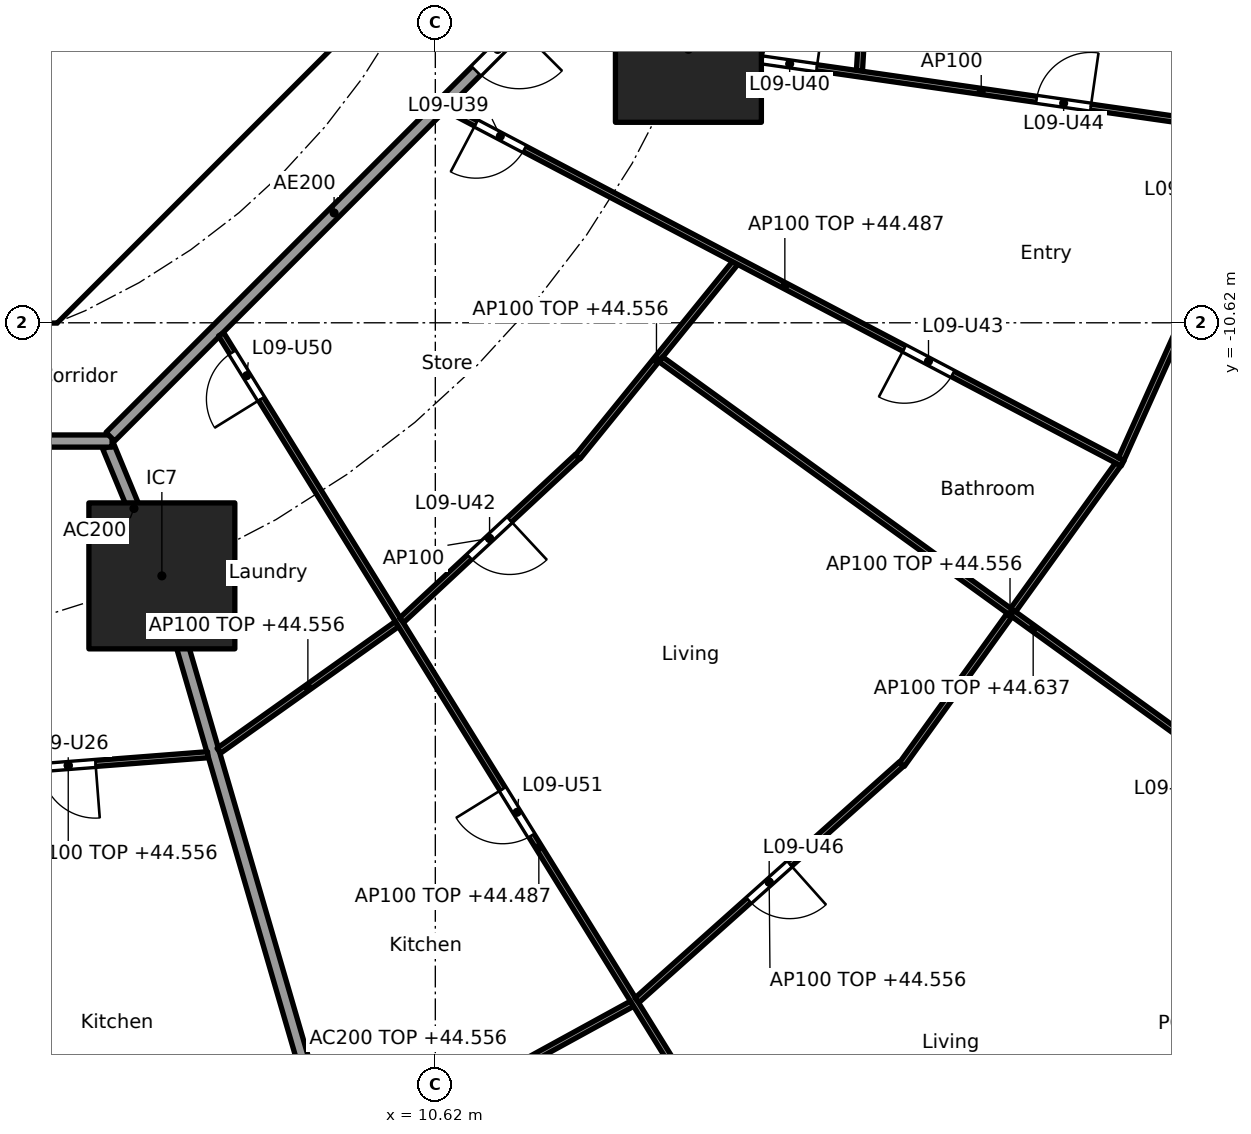
"""IFC4 building model, lengths in metres.
Left out: names, types, materials, properties, quantities, classifications, styles, units other than length and angle.
Written with IfcOpenShell. Run it as: python <this file> out.ifc"""

import sys

from ifc_helpers import new_model, si_unit, direction, frame, frame_2d, origin, origin_2d, place, context, subcontext, project, spatial, polyline, rectangle, outline, extrude, element, fill, save


model = new_model("IFC4")
c1 = context("Model", 3, precision=1e-05, world=origin(), true_north=direction((0.0, 1.0)))
c2 = subcontext(c1, "Body", "Model", "MODEL_VIEW")
j1 = project(units=[si_unit("LENGTHUNIT", "METRE"), si_unit("PLANEANGLEUNIT", "RADIAN")], contexts=[c1])
p1 = place(None, origin())
s1 = spatial("IfcSite", under=j1, at=p1, CompositionType="ELEMENT")
p2 = place(p1, origin())
s2 = spatial("IfcBuilding", under=s1, at=p2, CompositionType="ELEMENT")
p3 = place(p2, frame((0.0, 0.0, 41.8)))
s3 = spatial("IfcBuildingStorey", under=s2, at=p3, CompositionType="ELEMENT", Elevation=41.8)
for number, where, z_axis, x_axis in (
    (1, (6.123, -14.782, 0.0), (0.0, 0.0, 1.0), (1.0, 0.0, 0.0)),
    (2, (14.782, -6.123, 0.0), (0.0, 0.0, 1.0), (1.0, 0.0, 0.0)),
):
    element("IfcColumn", number, at=place(p3, frame(where, z_axis=z_axis, x_axis=x_axis)), inside=s3, PredefinedType="COLUMN", context=c2, shape_type="SweptSolid", body=[
        extrude(rectangle(XDim=2.4, YDim=2.4, at=origin_2d()), origin(), (0.0, 0.0, 1.0), 3.7),
    ])
p4 = place(p3, frame((4.613, -9.988, 0.0), z_axis=(0.0, 0.0, 1.0), x_axis=(0.707106781187, 0.707106781187, 0.0)))
e3 = element("IfcWall", 3, at=p4, inside=s3, PredefinedType="SHEAR", context=c2, shape_type="SweptSolid", body=[
    extrude(rectangle(XDim=7.602, YDim=0.6, at=frame_2d((3.801, 0.0))), origin(), (0.0, 0.0, 1.0), 3.44),
])
p5 = place(p4, frame((3.201, 0.0, 0.0)))
e4 = element("IfcOpeningElement", 4, at=p5, cuts=e3, PredefinedType="OPENING", context=c2, shape_type="SweptSolid", body=[
    extrude(rectangle(XDim=1.2, YDim=2.1, at=frame_2d((0.6, 1.05))), frame((0.0, 0.31, 0.0), z_axis=(0.0, -1.0, 0.0), x_axis=(1.0, 0.0, 0.0)), (0.0, 0.0, 1.0), 0.62),
])
p6 = place(p3, origin())
e5 = element("IfcWall", 5, at=p6, inside=s3, PredefinedType="SHEAR", context=c2, shape_type="SweptSolid", body=[
    extrude(outline(polyline([(-4.152, -10.025), (4.152, -10.025), (4.401, -9.776), (4.825, -10.2), (4.401, -10.625), (-4.401, -10.625), (-4.825, -10.2), (-4.401, -9.776), (-4.152, -10.025)])), origin(), (0.0, 0.0, 1.0), 3.44),
])
p7 = place(p3, frame((5.243, -12.657, 0.0), z_axis=(0.0, 0.0, 1.0), x_axis=(0.382707856524, -0.923869415315, 0.0)))
e6 = element("IfcWall", 6, at=p7, inside=s3, PredefinedType="PARTITIONING", context=c2, shape_type="SweptSolid", body=[
    extrude(rectangle(XDim=2.2, YDim=0.2, at=frame_2d((1.1, 0.0))), origin(), (0.0, 0.0, 1.0), 3.44),
])
p8 = place(p3, frame((6.137, -14.83, 0.0), z_axis=(0.0, 0.0, 1.0), x_axis=(0.27985745069, -0.960041565399, 0.0)))
e7 = element("IfcWall", 7, at=p8, inside=s3, PredefinedType="PARTITIONING", context=c2, shape_type="SweptSolid", body=[
    extrude(rectangle(XDim=16.705, YDim=0.2, at=frame_2d((8.353, 0.0))), origin(), (0.0, 0.0, 1.0), 2.756),
])
p9 = place(p3, frame((-5.104, -12.565, 0.0), z_axis=(0.0, 0.0, 1.0), x_axis=(1.0, 0.0, 0.0)))
e8 = element("IfcWall", 8, at=p9, inside=s3, PredefinedType="PARTITIONING", context=c2, shape_type="SweptSolid", body=[
    extrude(rectangle(XDim=10.409, YDim=0.2, at=frame_2d((5.205, 0.0))), origin(), (0.0, 0.0, 1.0), 3.44),
])
p10 = place(p9, frame((2.87, 0.0, 0.0)))
e9 = element("IfcOpeningElement", 9, at=p10, cuts=e8, PredefinedType="OPENING", context=c2, shape_type="SweptSolid", body=[
    extrude(rectangle(XDim=1.0, YDim=2.1, at=frame_2d((0.5, 1.05))), frame((0.0, 0.11, 0.0), z_axis=(0.0, -1.0, 0.0), x_axis=(1.0, 0.0, 0.0)), (0.0, 0.0, 1.0), 0.22),
])
p11 = place(p3, frame((5.275, -12.494, 0.0), z_axis=(0.0, 0.0, 1.0), x_axis=(0.707106781187, 0.707106781187, 0.0)))
e10 = element("IfcWall", 10, at=p11, inside=s3, PredefinedType="PARTITIONING", context=c2, shape_type="SweptSolid", body=[
    extrude(rectangle(XDim=10.409, YDim=0.2, at=frame_2d((5.205, 0.0))), origin(), (0.0, 0.0, 1.0), 3.44),
])
p12 = place(p11, frame((8.508, 0.0, 0.0)))
e11 = element("IfcOpeningElement", 11, at=p12, cuts=e10, PredefinedType="OPENING", context=c2, shape_type="SweptSolid", body=[
    extrude(rectangle(XDim=1.0, YDim=2.1, at=frame_2d((0.5, 1.05))), frame((0.0, 0.11, 0.0), z_axis=(0.0, -1.0, 0.0), x_axis=(1.0, 0.0, 0.0)), (0.0, 0.0, 1.0), 0.22),
])
p13 = place(p3, frame((17.971, -0.05, 0.0), z_axis=(0.0, 0.0, 1.0), x_axis=(-0.058475267553, -0.998288857538, 0.0)))
e12 = element("IfcWall", 12, at=p13, inside=s3, PredefinedType="PARTITIONING", context=c2, shape_type="SweptSolid", body=[
    extrude(rectangle(XDim=6.438, YDim=0.1, at=frame_2d((3.219, 0.0))), origin(), (0.0, 0.0, 1.0), 2.756),
])
p14 = place(p3, frame((2.288, -18.078, 0.0), z_axis=(0.0, 0.0, 1.0), x_axis=(0.99701850123, 0.077162868047, 0.0)))
e13 = element("IfcWall", 13, at=p14, inside=s3, PredefinedType="PARTITIONING", context=c2, shape_type="SweptSolid", body=[
    extrude(rectangle(XDim=4.604, YDim=0.1, at=frame_2d((2.302, 0.0))), origin(), (0.0, 0.0, 1.0), 2.756),
])
p15 = place(p14, frame((1.852, 0.0, 0.0)))
e14 = element("IfcOpeningElement", 14, at=p15, cuts=e13, PredefinedType="OPENING", context=c2, shape_type="SweptSolid", body=[
    extrude(rectangle(XDim=0.9, YDim=2.1, at=frame_2d((0.45, 1.05))), frame((0.0, 0.06, 0.0), z_axis=(0.0, -1.0, 0.0), x_axis=(1.0, 0.0, 0.0)), (0.0, 0.0, 1.0), 0.12),
])
p16 = place(p3, frame((7.06, -17.657, 0.0), z_axis=(0.0, 0.0, 1.0), x_axis=(0.81492039338, 0.57957290521, 0.0)))
e15 = element("IfcWall", 15, at=p16, inside=s3, PredefinedType="PARTITIONING", context=c2, shape_type="SweptSolid", body=[
    extrude(rectangle(XDim=3.594, YDim=0.1, at=frame_2d((1.797, 0.0))), origin(), (0.0, 0.0, 1.0), 2.756),
])
p17 = place(p3, frame((9.045, -24.456, 0.0), z_axis=(0.0, 0.0, 1.0), x_axis=(0.876809987787, 0.480837025734, 0.0)))
e16 = element("IfcWall", 16, at=p17, inside=s3, PredefinedType="PARTITIONING", context=c2, shape_type="SweptSolid", body=[
    extrude(rectangle(XDim=5.486, YDim=0.1, at=frame_2d((2.743, 0.0))), origin(), (0.0, 0.0, 1.0), 2.756),
])
p18 = place(p3, frame((7.097, -10.81, 0.0), z_axis=(0.0, 0.0, 1.0), x_axis=(0.526453266471, -0.850204068576, 0.0)))
e17 = element("IfcWall", 17, at=p18, inside=s3, PredefinedType="PARTITIONING", context=c2, shape_type="SweptSolid", body=[
    extrude(rectangle(XDim=19.85, YDim=0.1, at=frame_2d((9.925, 0.0))), origin(), (0.0, 0.0, 1.0), 2.687),
])
p19 = place(p18, frame((0.35, 0.0, 0.0)))
e18 = element("IfcOpeningElement", 18, at=p19, cuts=e17, PredefinedType="OPENING", context=c2, shape_type="SweptSolid", body=[
    extrude(rectangle(XDim=0.9, YDim=2.1, at=frame_2d((0.45, 1.05))), frame((0.0, 0.06, 0.0), z_axis=(0.0, -1.0, 0.0), x_axis=(1.0, 0.0, 0.0)), (0.0, 0.0, 1.0), 0.12),
])
p20 = place(p18, frame((8.795, 0.0, 0.0)))
e19 = element("IfcOpeningElement", 19, at=p20, cuts=e17, PredefinedType="OPENING", context=c2, shape_type="SweptSolid", body=[
    extrude(rectangle(XDim=0.9, YDim=2.1, at=frame_2d((0.45, 1.05))), frame((0.0, 0.06, 0.0), z_axis=(0.0, -1.0, 0.0), x_axis=(1.0, 0.0, 0.0)), (0.0, 0.0, 1.0), 0.12),
])
p21 = place(p18, frame((15.935, 0.0, 0.0)))
e20 = element("IfcOpeningElement", 20, at=p21, cuts=e17, PredefinedType="OPENING", context=c2, shape_type="SweptSolid", body=[
    extrude(rectangle(XDim=0.9, YDim=2.1, at=frame_2d((0.45, 1.05))), frame((0.0, 0.06, 0.0), z_axis=(0.0, -1.0, 0.0), x_axis=(1.0, 0.0, 0.0)), (0.0, 0.0, 1.0), 0.12),
])
p22 = place(p3, frame((10.066, -15.511, 0.0), z_axis=(0.0, 0.0, 1.0), x_axis=(0.732022571638, 0.681280378855, 0.0)))
e21 = element("IfcWall", 21, at=p22, inside=s3, PredefinedType="PARTITIONING", context=c2, shape_type="SweptSolid", body=[
    extrude(rectangle(XDim=3.95, YDim=0.1, at=frame_2d((1.975, 0.0))), origin(), (0.0, 0.0, 1.0), 3.44),
])
p23 = place(p22, frame((1.525, 0.0, 0.0)))
e22 = element("IfcOpeningElement", 22, at=p23, cuts=e21, PredefinedType="OPENING", context=c2, shape_type="SweptSolid", body=[
    extrude(rectangle(XDim=0.9, YDim=2.1, at=frame_2d((0.45, 1.05))), frame((0.0, 0.06, 0.0), z_axis=(0.0, -1.0, 0.0), x_axis=(1.0, 0.0, 0.0)), (0.0, 0.0, 1.0), 0.12),
])
p24 = place(p3, frame((13.936, -21.761, 0.0), z_axis=(0.0, 0.0, 1.0), x_axis=(0.745806142791, 0.666163041136, 0.0)))
e23 = element("IfcWall", 23, at=p24, inside=s3, PredefinedType="PARTITIONING", context=c2, shape_type="SweptSolid", body=[
    extrude(rectangle(XDim=5.831, YDim=0.1, at=frame_2d((2.915, 0.0))), origin(), (0.0, 0.0, 1.0), 2.756),
])
p25 = place(p24, frame((2.465, 0.0, 0.0)))
e24 = element("IfcOpeningElement", 24, at=p25, cuts=e23, PredefinedType="OPENING", context=c2, shape_type="SweptSolid", body=[
    extrude(rectangle(XDim=0.9, YDim=2.1, at=frame_2d((0.45, 1.05))), frame((0.0, 0.06, 0.0), z_axis=(0.0, -1.0, 0.0), x_axis=(1.0, 0.0, 0.0)), (0.0, 0.0, 1.0), 0.12),
])
p26 = place(p3, frame((12.963, -12.825, 0.0), z_axis=(0.0, 0.0, 1.0), x_axis=(0.63012473344, 0.776493928056, 0.0)))
e25 = element("IfcWall", 25, at=p26, inside=s3, PredefinedType="PARTITIONING", context=c2, shape_type="SweptSolid", body=[
    extrude(rectangle(XDim=4.106, YDim=0.1, at=frame_2d((2.053, 0.0))), origin(), (0.0, 0.0, 1.0), 2.756),
])
p27 = place(p3, frame((18.293, -17.884, 0.0), z_axis=(0.0, 0.0, 1.0), x_axis=(0.584558392935, 0.811351640936, 0.0)))
e26 = element("IfcWall", 26, at=p27, inside=s3, PredefinedType="PARTITIONING", context=c2, shape_type="SweptSolid", body=[
    extrude(rectangle(XDim=6.084, YDim=0.1, at=frame_2d((3.042, 0.0))), origin(), (0.0, 0.0, 1.0), 2.756),
])
p28 = place(p3, frame((14.329, -11.221, 0.0), z_axis=(0.0, 0.0, 1.0), x_axis=(0.810671130917, -0.58550176558, 0.0)))
e27 = element("IfcWall", 27, at=p28, inside=s3, PredefinedType="PARTITIONING", context=c2, shape_type="SweptSolid", body=[
    extrude(rectangle(XDim=15.106, YDim=0.1, at=frame_2d((7.553, 0.0))), origin(), (0.0, 0.0, 1.0), 2.837),
])
p29 = place(p28, frame((10.659, 0.0, 0.0)))
e28 = element("IfcOpeningElement", 28, at=p29, cuts=e27, PredefinedType="OPENING", context=c2, shape_type="SweptSolid", body=[
    extrude(rectangle(XDim=0.9, YDim=2.1, at=frame_2d((0.45, 1.05))), frame((0.0, 0.06, 0.0), z_axis=(0.0, -1.0, 0.0), x_axis=(1.0, 0.0, 0.0)), (0.0, 0.0, 1.0), 0.12),
])
p30 = place(p3, frame((10.813, -7.091, 0.0), z_axis=(0.0, 0.0, 1.0), x_axis=(0.885182649479, -0.465243674928, 0.0)))
e29 = element("IfcWall", 29, at=p30, inside=s3, PredefinedType="PARTITIONING", context=c2, shape_type="SweptSolid", body=[
    extrude(rectangle(XDim=12.551, YDim=0.1, at=frame_2d((6.275, 0.0))), origin(), (0.0, 0.0, 1.0), 2.687),
])
p31 = place(p30, frame((0.539, 0.0, 0.0)))
e30 = element("IfcOpeningElement", 30, at=p31, cuts=e29, PredefinedType="OPENING", context=c2, shape_type="SweptSolid", body=[
    extrude(rectangle(XDim=0.9, YDim=2.1, at=frame_2d((0.45, 1.05))), frame((0.0, 0.06, 0.0), z_axis=(0.0, -1.0, 0.0), x_axis=(1.0, 0.0, 0.0)), (0.0, 0.0, 1.0), 0.12),
])
p32 = place(p30, frame((8.494, 0.0, 0.0)))
e31 = element("IfcOpeningElement", 31, at=p32, cuts=e29, PredefinedType="OPENING", context=c2, shape_type="SweptSolid", body=[
    extrude(rectangle(XDim=0.9, YDim=2.1, at=frame_2d((0.45, 1.05))), frame((0.0, 0.06, 0.0), z_axis=(0.0, -1.0, 0.0), x_axis=(1.0, 0.0, 0.0)), (0.0, 0.0, 1.0), 0.12),
])
p33 = place(p3, frame((21.899, -12.861, 0.0), z_axis=(0.0, 0.0, 1.0), x_axis=(0.410197710154, 0.911996622025, 0.0)))
e32 = element("IfcWall", 32, at=p33, inside=s3, PredefinedType="PARTITIONING", context=c2, shape_type="SweptSolid", body=[
    extrude(rectangle(XDim=5.837, YDim=0.1, at=frame_2d((2.918, 0.0))), origin(), (0.0, 0.0, 1.0), 2.756),
])
p34 = place(p33, frame((3.928, 0.0, 0.0)))
e33 = element("IfcOpeningElement", 33, at=p34, cuts=e32, PredefinedType="OPENING", context=c2, shape_type="SweptSolid", body=[
    extrude(rectangle(XDim=0.9, YDim=2.1, at=frame_2d((0.45, 1.05))), frame((0.0, 0.06, 0.0), z_axis=(0.0, -1.0, 0.0), x_axis=(1.0, 0.0, 0.0)), (0.0, 0.0, 1.0), 0.12),
])
p35 = place(p3, frame((14.832, -6.13, 0.0), z_axis=(0.0, 0.0, 1.0), x_axis=(0.989837122016, -0.142205737856, 0.0)))
e34 = element("IfcWall", 34, at=p35, inside=s3, PredefinedType="PARTITIONING", context=c2, shape_type="SweptSolid", body=[
    extrude(rectangle(XDim=9.63, YDim=0.1, at=frame_2d((4.815, 0.0))), origin(), (0.0, 0.0, 1.0), 3.44),
])
p36 = place(p35, frame((1.182, 0.0, 0.0)))
e35 = element("IfcOpeningElement", 35, at=p36, cuts=e34, PredefinedType="OPENING", context=c2, shape_type="SweptSolid", body=[
    extrude(rectangle(XDim=0.9, YDim=2.1, at=frame_2d((0.45, 1.05))), frame((0.0, 0.06, 0.0), z_axis=(0.0, -1.0, 0.0), x_axis=(1.0, 0.0, 0.0)), (0.0, 0.0, 1.0), 0.12),
])
p37 = place(p35, frame((5.734, 0.0, 0.0)))
e36 = element("IfcOpeningElement", 36, at=p37, cuts=e34, PredefinedType="OPENING", context=c2, shape_type="SweptSolid", body=[
    extrude(rectangle(XDim=0.9, YDim=2.1, at=frame_2d((0.45, 1.05))), frame((0.0, 0.06, 0.0), z_axis=(0.0, -1.0, 0.0), x_axis=(1.0, 0.0, 0.0)), (0.0, 0.0, 1.0), 0.12),
])
p38 = place(p5, origin())
e37 = element("IfcDoor", 37, at=p38, inside=s3, OperationType="SINGLE_SWING_RIGHT", PredefinedType="DOOR", context=c2, shape_type="SweptSolid", body=[
    extrude(rectangle(XDim=1.2, YDim=2.1, at=frame_2d((0.6, 1.05))), frame((0.0, 0.025, 0.0), z_axis=(0.0, -1.0, 0.0), x_axis=(1.0, 0.0, 0.0)), (0.0, 0.0, 1.0), 0.05),
])
fill(e4, e37)
p39 = place(p15, frame((0.9, 0.0, 0.0), x_axis=(-1.0, 0.0, 0.0)))
e38 = element("IfcDoor", 38, at=p39, inside=s3, OperationType="SINGLE_SWING_LEFT", PredefinedType="DOOR", context=c2, shape_type="SweptSolid", body=[
    extrude(rectangle(XDim=0.9, YDim=2.1, at=frame_2d((0.45, 1.05))), frame((0.0, 0.025, 0.0), z_axis=(0.0, -1.0, 0.0), x_axis=(1.0, 0.0, 0.0)), (0.0, 0.0, 1.0), 0.05),
])
fill(e14, e38)
p40 = place(p12, frame((1.0, 0.0, 0.0), x_axis=(-1.0, 0.0, 0.0)))
e39 = element("IfcDoor", 39, at=p40, inside=s3, OperationType="SINGLE_SWING_LEFT", PredefinedType="DOOR", context=c2, shape_type="SweptSolid", body=[
    extrude(rectangle(XDim=1.0, YDim=2.1, at=frame_2d((0.5, 1.05))), frame((0.0, 0.025, 0.0), z_axis=(0.0, -1.0, 0.0), x_axis=(1.0, 0.0, 0.0)), (0.0, 0.0, 1.0), 0.05),
])
fill(e11, e39)
p41 = place(p31, frame((0.9, 0.0, 0.0), x_axis=(-1.0, 0.0, 0.0)))
e40 = element("IfcDoor", 40, at=p41, inside=s3, OperationType="SINGLE_SWING_RIGHT", PredefinedType="DOOR", context=c2, shape_type="SweptSolid", body=[
    extrude(rectangle(XDim=0.9, YDim=2.1, at=frame_2d((0.45, 1.05))), frame((0.0, 0.025, 0.0), z_axis=(0.0, -1.0, 0.0), x_axis=(1.0, 0.0, 0.0)), (0.0, 0.0, 1.0), 0.05),
])
fill(e30, e40)
p42 = place(p36, origin())
e41 = element("IfcDoor", 41, at=p42, inside=s3, OperationType="SINGLE_SWING_RIGHT", PredefinedType="DOOR", context=c2, shape_type="SweptSolid", body=[
    extrude(rectangle(XDim=0.9, YDim=2.1, at=frame_2d((0.45, 1.05))), frame((0.0, 0.025, 0.0), z_axis=(0.0, -1.0, 0.0), x_axis=(1.0, 0.0, 0.0)), (0.0, 0.0, 1.0), 0.05),
])
fill(e35, e41)
p43 = place(p23, frame((0.9, 0.0, 0.0), x_axis=(-1.0, 0.0, 0.0)))
e42 = element("IfcDoor", 42, at=p43, inside=s3, OperationType="SINGLE_SWING_LEFT", PredefinedType="DOOR", context=c2, shape_type="SweptSolid", body=[
    extrude(rectangle(XDim=0.9, YDim=2.1, at=frame_2d((0.45, 1.05))), frame((0.0, 0.025, 0.0), z_axis=(0.0, -1.0, 0.0), x_axis=(1.0, 0.0, 0.0)), (0.0, 0.0, 1.0), 0.05),
])
fill(e22, e42)
p44 = place(p32, frame((0.9, 0.0, 0.0), x_axis=(-1.0, 0.0, 0.0)))
e43 = element("IfcDoor", 43, at=p44, inside=s3, OperationType="SINGLE_SWING_RIGHT", PredefinedType="DOOR", context=c2, shape_type="SweptSolid", body=[
    extrude(rectangle(XDim=0.9, YDim=2.1, at=frame_2d((0.45, 1.05))), frame((0.0, 0.025, 0.0), z_axis=(0.0, -1.0, 0.0), x_axis=(1.0, 0.0, 0.0)), (0.0, 0.0, 1.0), 0.05),
])
fill(e31, e43)
p45 = place(p37, origin())
e44 = element("IfcDoor", 44, at=p45, inside=s3, OperationType="SINGLE_SWING_RIGHT", PredefinedType="DOOR", context=c2, shape_type="SweptSolid", body=[
    extrude(rectangle(XDim=0.9, YDim=2.1, at=frame_2d((0.45, 1.05))), frame((0.0, 0.025, 0.0), z_axis=(0.0, -1.0, 0.0), x_axis=(1.0, 0.0, 0.0)), (0.0, 0.0, 1.0), 0.05),
])
fill(e36, e44)
p46 = place(p25, frame((0.9, 0.0, 0.0), x_axis=(-1.0, 0.0, 0.0)))
e45 = element("IfcDoor", 45, at=p46, inside=s3, OperationType="SINGLE_SWING_LEFT", PredefinedType="DOOR", context=c2, shape_type="SweptSolid", body=[
    extrude(rectangle(XDim=0.9, YDim=2.1, at=frame_2d((0.45, 1.05))), frame((0.0, 0.025, 0.0), z_axis=(0.0, -1.0, 0.0), x_axis=(1.0, 0.0, 0.0)), (0.0, 0.0, 1.0), 0.05),
])
fill(e24, e45)
p47 = place(p19, frame((0.9, 0.0, 0.0), x_axis=(-1.0, 0.0, 0.0)))
e46 = element("IfcDoor", 46, at=p47, inside=s3, OperationType="SINGLE_SWING_LEFT", PredefinedType="DOOR", context=c2, shape_type="SweptSolid", body=[
    extrude(rectangle(XDim=0.9, YDim=2.1, at=frame_2d((0.45, 1.05))), frame((0.0, 0.025, 0.0), z_axis=(0.0, -1.0, 0.0), x_axis=(1.0, 0.0, 0.0)), (0.0, 0.0, 1.0), 0.05),
])
fill(e18, e46)
p48 = place(p20, frame((0.9, 0.0, 0.0), x_axis=(-1.0, 0.0, 0.0)))
e47 = element("IfcDoor", 47, at=p48, inside=s3, OperationType="SINGLE_SWING_RIGHT", PredefinedType="DOOR", context=c2, shape_type="SweptSolid", body=[
    extrude(rectangle(XDim=0.9, YDim=2.1, at=frame_2d((0.45, 1.05))), frame((0.0, 0.025, 0.0), z_axis=(0.0, -1.0, 0.0), x_axis=(1.0, 0.0, 0.0)), (0.0, 0.0, 1.0), 0.05),
])
fill(e19, e47)
save(model, sys.argv[1])
